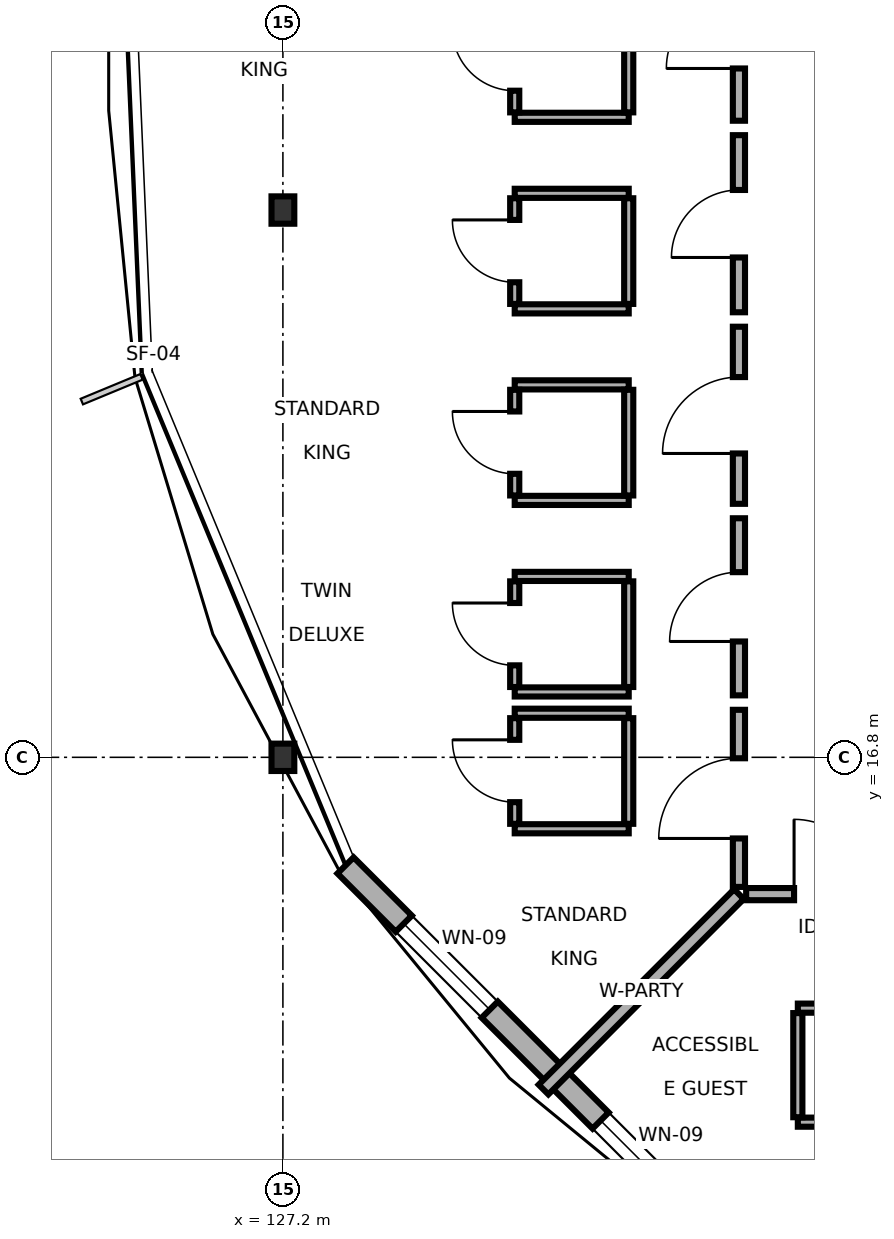
"""IFC4 building model, lengths in metres.
Left out: names, types, materials, properties, quantities, classifications, styles, units other than length and angle.
Written with IfcOpenShell. Run it as: python <this file> out.ifc"""

import sys

from ifc_helpers import new_model, si_unit, direction, frame, frame_2d, origin, origin_2d, place, context, subcontext, project, spatial, rectangle, i_section, extrude, element, fill, save


model = new_model("IFC4")
c1 = context("Model", 3, precision=1e-05, world=origin(), true_north=direction((0.0, 1.0)))
c2 = subcontext(c1, "Body", "Model", "MODEL_VIEW")
j1 = project(units=[si_unit("LENGTHUNIT", "METRE"), si_unit("PLANEANGLEUNIT", "RADIAN")], contexts=[c1])
p1 = place(None, origin())
s1 = spatial("IfcSite", under=j1, at=p1, CompositionType="ELEMENT")
p2 = place(p1, origin())
s2 = spatial("IfcBuilding", under=s1, at=p2, CompositionType="ELEMENT")
p3 = place(p2, frame((0.0, 0.0, 35.1)))
s3 = spatial("IfcBuildingStorey", under=s2, at=p3, CompositionType="ELEMENT", Elevation=35.1)
for number, where, z_axis, x_axis in (
    (1, (127.2, 24.0, 0.0), (0.0, 0.0, 1.0), (1.0, 0.0, 0.0)),
    (2, (127.2, 16.8, 0.0), (0.0, 0.0, 1.0), (1.0, 0.0, 0.0)),
):
    element("IfcColumn", number, at=place(p3, frame(where, z_axis=z_axis, x_axis=x_axis)), inside=s3, PredefinedType="COLUMN", context=c2, shape_type="SweptSolid", body=[
        extrude(i_section(OverallWidth=0.3, OverallDepth=0.36, WebThickness=0.012, FlangeThickness=0.022, FilletRadius=0.027, at=origin_2d()), origin(), (0.0, 0.0, 1.0), 3.4),
    ])
p4 = place(p3, frame((128.024, 15.378, 0.0), z_axis=(0.0, 0.0, 1.0), x_axis=(0.707124205549, -0.707089356394, 0.0)))
e3 = element("IfcWall", 3, at=p4, inside=s3, PredefinedType="SOLIDWALL", context=c2, shape_type="SweptSolid", body=[
    extrude(rectangle(XDim=7.006, YDim=0.3, at=frame_2d((3.503, 0.0))), origin(), (0.0, 0.0, 1.0), 3.165),
])
p5 = place(p4, frame((4.746, 0.0, 0.8)))
e4 = element("IfcOpeningElement", 4, at=p5, cuts=e3, PredefinedType="OPENING", context=c2, shape_type="SweptSolid", body=[
    extrude(rectangle(XDim=1.6, YDim=1.5, at=frame_2d((0.8, 0.75))), frame((0.0, 0.16, 0.0), z_axis=(0.0, -1.0, 0.0), x_axis=(1.0, 0.0, 0.0)), (0.0, 0.0, 1.0), 0.32),
])
p6 = place(p4, frame((1.083, 0.0, 0.8)))
e5 = element("IfcOpeningElement", 5, at=p6, cuts=e3, PredefinedType="OPENING", context=c2, shape_type="SweptSolid", body=[
    extrude(rectangle(XDim=1.6, YDim=1.5, at=frame_2d((0.8, 0.75))), frame((0.0, 0.16, 0.0), z_axis=(0.0, -1.0, 0.0), x_axis=(1.0, 0.0, 0.0)), (0.0, 0.0, 1.0), 0.32),
])
p7 = place(p3, frame((133.295, 15.0, 0.0), z_axis=(0.0, 0.0, 1.0), x_axis=(1.0, 0.0, 0.0)))
e6 = element("IfcWall", 6, at=p7, inside=s3, PredefinedType="PARTITIONING", context=c2, shape_type="SweptSolid", body=[
    extrude(rectangle(XDim=2.245, YDim=0.16, at=frame_2d((1.123, 0.0))), origin(), (0.0, 0.0, 1.0), 3.165),
])
p8 = place(p7, frame((0.631, 0.0, 0.0)))
e7 = element("IfcOpeningElement", 7, at=p8, cuts=e6, PredefinedType="OPENING", context=c2, shape_type="SweptSolid", body=[
    extrude(rectangle(XDim=0.984, YDim=2.07, at=frame_2d((0.492, 1.035))), frame((0.0, 0.09, 0.0), z_axis=(0.0, -1.0, 0.0), x_axis=(1.0, 0.0, 0.0)), (0.0, 0.0, 1.0), 0.18),
])
p9 = place(p3, frame((133.975, 12.0, 0.0), z_axis=(0.0, 0.0, 1.0), x_axis=(1.0, 0.0, 0.0)))
e8 = element("IfcWall", 8, at=p9, inside=s3, PredefinedType="PARTITIONING", context=c2, shape_type="SweptSolid", body=[
    extrude(rectangle(XDim=1.52, YDim=0.12, at=frame_2d((0.76, 0.0))), origin(), (0.0, 0.0, 1.0), 2.75),
])
p10 = place(p9, frame((0.35, 0.0, 0.0)))
e9 = element("IfcOpeningElement", 9, at=p10, cuts=e8, PredefinedType="OPENING", context=c2, shape_type="SweptSolid", body=[
    extrude(rectangle(XDim=0.82, YDim=2.08, at=frame_2d((0.41, 1.04))), frame((0.0, 0.07, 0.0), z_axis=(0.0, -1.0, 0.0), x_axis=(1.0, 0.0, 0.0)), (0.0, 0.0, 1.0), 0.14),
])
p11 = place(p3, frame((133.975, 13.5, 0.0), z_axis=(0.0, 0.0, 1.0), x_axis=(1.0, 0.0, 0.0)))
e10 = element("IfcWall", 10, at=p11, inside=s3, PredefinedType="PARTITIONING", context=c2, shape_type="SweptSolid", body=[
    extrude(rectangle(XDim=1.52, YDim=0.12, at=frame_2d((0.76, 0.0))), origin(), (0.0, 0.0, 1.0), 3.165),
])
p12 = place(p3, frame((133.975, 12.065, 0.0), z_axis=(0.0, 0.0, 1.0), x_axis=(0.0, 1.0, 0.0)))
e11 = element("IfcWall", 11, at=p12, inside=s3, PredefinedType="PARTITIONING", context=c2, shape_type="SweptSolid", body=[
    extrude(rectangle(XDim=1.37, YDim=0.12, at=frame_2d((0.685, 0.0))), origin(), (0.0, 0.0, 1.0), 3.165),
])
p13 = place(p3, frame((133.2, 15.0, 0.0), z_axis=(0.0, 0.0, 1.0), x_axis=(-0.707106781187, -0.707106781187, 0.0)))
e12 = element("IfcWall", 12, at=p13, inside=s3, PredefinedType="PARTITIONING", context=c2, shape_type="SweptSolid", body=[
    extrude(rectangle(XDim=3.636, YDim=0.18, at=frame_2d((1.818, 0.0))), origin(), (0.0, 0.0, 1.0), 2.65),
])
p14 = place(p3, frame((133.2, 25.175, 0.0), z_axis=(0.0, 0.0, 1.0), x_axis=(0.0, 1.0, 0.0)))
e13 = element("IfcWall", 13, at=p14, inside=s3, PredefinedType="PARTITIONING", context=c2, shape_type="SweptSolid", body=[
    extrude(rectangle(XDim=2.33, YDim=0.16, at=frame_2d((1.165, 0.0))), origin(), (0.0, 0.0, 1.0), 3.165),
])
p15 = place(p14, frame((0.688, 0.0, 0.0)))
e14 = element("IfcOpeningElement", 14, at=p15, cuts=e13, PredefinedType="OPENING", context=c2, shape_type="SweptSolid", body=[
    extrude(rectangle(XDim=0.955, YDim=2.05, at=frame_2d((0.478, 1.025))), frame((0.0, 0.09, 0.0), z_axis=(0.0, -1.0, 0.0), x_axis=(1.0, 0.0, 0.0)), (0.0, 0.0, 1.0), 0.18),
])
p16 = place(p3, frame((130.25, 25.22, 0.0), z_axis=(0.0, 0.0, 1.0), x_axis=(1.0, 0.0, 0.0)))
e15 = element("IfcWall", 15, at=p16, inside=s3, PredefinedType="PARTITIONING", context=c2, shape_type="SweptSolid", body=[
    extrude(rectangle(XDim=1.5, YDim=0.12, at=frame_2d((0.75, 0.0))), origin(), (0.0, 0.0, 1.0), 3.165),
])
p17 = place(p3, frame((130.25, 25.285, 0.0), z_axis=(0.0, 0.0, 1.0), x_axis=(0.0, 1.0, 0.0)))
e16 = element("IfcWall", 16, at=p17, inside=s3, PredefinedType="PARTITIONING", context=c2, shape_type="SweptSolid", body=[
    extrude(rectangle(XDim=1.39, YDim=0.12, at=frame_2d((0.695, 0.0))), origin(), (0.0, 0.0, 1.0), 3.165),
])
p18 = place(p17, frame((0.285, 0.0, 0.0)))
e17 = element("IfcOpeningElement", 17, at=p18, cuts=e16, PredefinedType="OPENING", context=c2, shape_type="SweptSolid", body=[
    extrude(rectangle(XDim=0.82, YDim=2.08, at=frame_2d((0.41, 1.04))), frame((0.0, 0.07, 0.0), z_axis=(0.0, -1.0, 0.0), x_axis=(1.0, 0.0, 0.0)), (0.0, 0.0, 1.0), 0.14),
])
p19 = place(p3, frame((131.75, 25.285, 0.0), z_axis=(0.0, 0.0, 1.0), x_axis=(0.0, 1.0, 0.0)))
e18 = element("IfcWall", 18, at=p19, inside=s3, PredefinedType="PARTITIONING", context=c2, shape_type="SweptSolid", body=[
    extrude(rectangle(XDim=1.39, YDim=0.12, at=frame_2d((0.695, 0.0))), origin(), (0.0, 0.0, 1.0), 3.165),
])
p20 = place(p3, frame((133.2, 22.655, 0.0), z_axis=(0.0, 0.0, 1.0), x_axis=(0.0, 1.0, 0.0)))
e19 = element("IfcWall", 19, at=p20, inside=s3, PredefinedType="PARTITIONING", context=c2, shape_type="SweptSolid", body=[
    extrude(rectangle(XDim=2.33, YDim=0.16, at=frame_2d((1.165, 0.0))), origin(), (0.0, 0.0, 1.0), 2.75),
])
p21 = place(p20, frame((0.721, 0.0, 0.0)))
e20 = element("IfcOpeningElement", 20, at=p21, cuts=e19, PredefinedType="OPENING", context=c2, shape_type="SweptSolid", body=[
    extrude(rectangle(XDim=0.888, YDim=2.07, at=frame_2d((0.444, 1.035))), frame((0.0, 0.09, 0.0), z_axis=(0.0, -1.0, 0.0), x_axis=(1.0, 0.0, 0.0)), (0.0, 0.0, 1.0), 0.18),
])
p22 = place(p3, frame((130.25, 22.7, 0.0), z_axis=(0.0, 0.0, 1.0), x_axis=(1.0, 0.0, 0.0)))
e21 = element("IfcWall", 21, at=p22, inside=s3, PredefinedType="PARTITIONING", context=c2, shape_type="SweptSolid", body=[
    extrude(rectangle(XDim=1.5, YDim=0.12, at=frame_2d((0.75, 0.0))), origin(), (0.0, 0.0, 1.0), 3.165),
])
p23 = place(p3, frame((130.25, 24.22, 0.0), z_axis=(0.0, 0.0, 1.0), x_axis=(1.0, 0.0, 0.0)))
e22 = element("IfcWall", 22, at=p23, inside=s3, PredefinedType="PARTITIONING", context=c2, shape_type="SweptSolid", body=[
    extrude(rectangle(XDim=1.5, YDim=0.12, at=frame_2d((0.75, 0.0))), origin(), (0.0, 0.0, 1.0), 2.75),
])
p24 = place(p3, frame((130.25, 22.765, 0.0), z_axis=(0.0, 0.0, 1.0), x_axis=(0.0, 1.0, 0.0)))
e23 = element("IfcWall", 23, at=p24, inside=s3, PredefinedType="PARTITIONING", context=c2, shape_type="SweptSolid", body=[
    extrude(rectangle(XDim=1.39, YDim=0.12, at=frame_2d((0.695, 0.0))), origin(), (0.0, 0.0, 1.0), 2.75),
])
p25 = place(p24, frame((0.285, 0.0, 0.0)))
e24 = element("IfcOpeningElement", 24, at=p25, cuts=e23, PredefinedType="OPENING", context=c2, shape_type="SweptSolid", body=[
    extrude(rectangle(XDim=0.82, YDim=2.08, at=frame_2d((0.41, 1.04))), frame((0.0, 0.07, 0.0), z_axis=(0.0, -1.0, 0.0), x_axis=(1.0, 0.0, 0.0)), (0.0, 0.0, 1.0), 0.14),
])
p26 = place(p3, frame((131.75, 22.765, 0.0), z_axis=(0.0, 0.0, 1.0), x_axis=(0.0, 1.0, 0.0)))
e25 = element("IfcWall", 25, at=p26, inside=s3, PredefinedType="PARTITIONING", context=c2, shape_type="SweptSolid", body=[
    extrude(rectangle(XDim=1.39, YDim=0.12, at=frame_2d((0.695, 0.0))), origin(), (0.0, 0.0, 1.0), 2.75),
])
p27 = place(p3, frame((133.2, 20.135, 0.0), z_axis=(0.0, 0.0, 1.0), x_axis=(0.0, 1.0, 0.0)))
e26 = element("IfcWall", 26, at=p27, inside=s3, PredefinedType="PARTITIONING", context=c2, shape_type="SweptSolid", body=[
    extrude(rectangle(XDim=2.33, YDim=0.16, at=frame_2d((1.165, 0.0))), origin(), (0.0, 0.0, 1.0), 3.165),
])
p28 = place(p27, frame((0.663, 0.0, 0.0)))
e27 = element("IfcOpeningElement", 27, at=p28, cuts=e26, PredefinedType="OPENING", context=c2, shape_type="SweptSolid", body=[
    extrude(rectangle(XDim=1.005, YDim=2.05, at=frame_2d((0.502, 1.025))), frame((0.0, 0.09, 0.0), z_axis=(0.0, -1.0, 0.0), x_axis=(1.0, 0.0, 0.0)), (0.0, 0.0, 1.0), 0.18),
])
for number, where, z_axis, x_axis in (
    (28, (130.25, 20.18, 0.0), (0.0, 0.0, 1.0), (1.0, 0.0, 0.0)),
    (29, (130.25, 21.7, 0.0), (0.0, 0.0, 1.0), (1.0, 0.0, 0.0)),
):
    element("IfcWall", number, at=place(p3, frame(where, z_axis=z_axis, x_axis=x_axis)), inside=s3, PredefinedType="PARTITIONING", context=c2, shape_type="SweptSolid", body=[
        extrude(rectangle(XDim=1.5, YDim=0.12, at=frame_2d((0.75, 0.0))), origin(), (0.0, 0.0, 1.0), 3.165),
    ])
p29 = place(p3, frame((130.25, 20.245, 0.0), z_axis=(0.0, 0.0, 1.0), x_axis=(0.0, 1.0, 0.0)))
e30 = element("IfcWall", 30, at=p29, inside=s3, PredefinedType="PARTITIONING", context=c2, shape_type="SweptSolid", body=[
    extrude(rectangle(XDim=1.39, YDim=0.12, at=frame_2d((0.695, 0.0))), origin(), (0.0, 0.0, 1.0), 3.165),
])
p30 = place(p29, frame((0.285, 0.0, 0.0)))
e31 = element("IfcOpeningElement", 31, at=p30, cuts=e30, PredefinedType="OPENING", context=c2, shape_type="SweptSolid", body=[
    extrude(rectangle(XDim=0.82, YDim=2.08, at=frame_2d((0.41, 1.04))), frame((0.0, 0.07, 0.0), z_axis=(0.0, -1.0, 0.0), x_axis=(1.0, 0.0, 0.0)), (0.0, 0.0, 1.0), 0.14),
])
p31 = place(p3, frame((131.75, 20.245, 0.0), z_axis=(0.0, 0.0, 1.0), x_axis=(0.0, 1.0, 0.0)))
e32 = element("IfcWall", 32, at=p31, inside=s3, PredefinedType="PARTITIONING", context=c2, shape_type="SweptSolid", body=[
    extrude(rectangle(XDim=1.39, YDim=0.12, at=frame_2d((0.695, 0.0))), origin(), (0.0, 0.0, 1.0), 3.165),
])
p32 = place(p3, frame((133.2, 17.615, 0.0), z_axis=(0.0, 0.0, 1.0), x_axis=(0.0, 1.0, 0.0)))
e33 = element("IfcWall", 33, at=p32, inside=s3, PredefinedType="PARTITIONING", context=c2, shape_type="SweptSolid", body=[
    extrude(rectangle(XDim=2.33, YDim=0.16, at=frame_2d((1.165, 0.0))), origin(), (0.0, 0.0, 1.0), 3.165),
])
p33 = place(p32, frame((0.709, 0.0, 0.0)))
e34 = element("IfcOpeningElement", 34, at=p33, cuts=e33, PredefinedType="OPENING", context=c2, shape_type="SweptSolid", body=[
    extrude(rectangle(XDim=0.912, YDim=2.13, at=frame_2d((0.456, 1.065))), frame((0.0, 0.09, 0.0), z_axis=(0.0, -1.0, 0.0), x_axis=(1.0, 0.0, 0.0)), (0.0, 0.0, 1.0), 0.18),
])
for number, where, z_axis, x_axis in (
    (35, (130.25, 17.66, 0.0), (0.0, 0.0, 1.0), (1.0, 0.0, 0.0)),
    (36, (130.25, 19.18, 0.0), (0.0, 0.0, 1.0), (1.0, 0.0, 0.0)),
):
    element("IfcWall", number, at=place(p3, frame(where, z_axis=z_axis, x_axis=x_axis)), inside=s3, PredefinedType="PARTITIONING", context=c2, shape_type="SweptSolid", body=[
        extrude(rectangle(XDim=1.5, YDim=0.12, at=frame_2d((0.75, 0.0))), origin(), (0.0, 0.0, 1.0), 3.165),
    ])
p34 = place(p3, frame((130.25, 17.725, 0.0), z_axis=(0.0, 0.0, 1.0), x_axis=(0.0, 1.0, 0.0)))
e37 = element("IfcWall", 37, at=p34, inside=s3, PredefinedType="PARTITIONING", context=c2, shape_type="SweptSolid", body=[
    extrude(rectangle(XDim=1.39, YDim=0.12, at=frame_2d((0.695, 0.0))), origin(), (0.0, 0.0, 1.0), 3.165),
])
p35 = place(p34, frame((0.285, 0.0, 0.0)))
e38 = element("IfcOpeningElement", 38, at=p35, cuts=e37, PredefinedType="OPENING", context=c2, shape_type="SweptSolid", body=[
    extrude(rectangle(XDim=0.82, YDim=2.08, at=frame_2d((0.41, 1.04))), frame((0.0, 0.07, 0.0), z_axis=(0.0, -1.0, 0.0), x_axis=(1.0, 0.0, 0.0)), (0.0, 0.0, 1.0), 0.14),
])
p36 = place(p3, frame((131.75, 17.725, 0.0), z_axis=(0.0, 0.0, 1.0), x_axis=(0.0, 1.0, 0.0)))
e39 = element("IfcWall", 39, at=p36, inside=s3, PredefinedType="PARTITIONING", context=c2, shape_type="SweptSolid", body=[
    extrude(rectangle(XDim=1.39, YDim=0.12, at=frame_2d((0.695, 0.0))), origin(), (0.0, 0.0, 1.0), 3.165),
])
p37 = place(p3, frame((133.2, 15.095, 0.0), z_axis=(0.0, 0.0, 1.0), x_axis=(0.0, 1.0, 0.0)))
e40 = element("IfcWall", 40, at=p37, inside=s3, PredefinedType="PARTITIONING", context=c2, shape_type="SweptSolid", body=[
    extrude(rectangle(XDim=2.33, YDim=0.16, at=frame_2d((1.165, 0.0))), origin(), (0.0, 0.0, 1.0), 2.75),
])
p38 = place(p37, frame((0.637, 0.0, 0.0)))
e41 = element("IfcOpeningElement", 41, at=p38, cuts=e40, PredefinedType="OPENING", context=c2, shape_type="SweptSolid", body=[
    extrude(rectangle(XDim=1.055, YDim=2.05, at=frame_2d((0.527, 1.025))), frame((0.0, 0.09, 0.0), z_axis=(0.0, -1.0, 0.0), x_axis=(1.0, 0.0, 0.0)), (0.0, 0.0, 1.0), 0.18),
])
for number, where, z_axis, x_axis in (
    (42, (130.25, 15.86, 0.0), (0.0, 0.0, 1.0), (1.0, 0.0, 0.0)),
    (43, (130.25, 17.38, 0.0), (0.0, 0.0, 1.0), (1.0, 0.0, 0.0)),
):
    element("IfcWall", number, at=place(p3, frame(where, z_axis=z_axis, x_axis=x_axis)), inside=s3, PredefinedType="PARTITIONING", context=c2, shape_type="SweptSolid", body=[
        extrude(rectangle(XDim=1.5, YDim=0.12, at=frame_2d((0.75, 0.0))), origin(), (0.0, 0.0, 1.0), 3.165),
    ])
p39 = place(p3, frame((130.25, 15.925, 0.0), z_axis=(0.0, 0.0, 1.0), x_axis=(0.0, 1.0, 0.0)))
e44 = element("IfcWall", 44, at=p39, inside=s3, PredefinedType="PARTITIONING", context=c2, shape_type="SweptSolid", body=[
    extrude(rectangle(XDim=1.39, YDim=0.12, at=frame_2d((0.695, 0.0))), origin(), (0.0, 0.0, 1.0), 2.75),
])
p40 = place(p39, frame((0.285, 0.0, 0.0)))
e45 = element("IfcOpeningElement", 45, at=p40, cuts=e44, PredefinedType="OPENING", context=c2, shape_type="SweptSolid", body=[
    extrude(rectangle(XDim=0.82, YDim=2.08, at=frame_2d((0.41, 1.04))), frame((0.0, 0.07, 0.0), z_axis=(0.0, -1.0, 0.0), x_axis=(1.0, 0.0, 0.0)), (0.0, 0.0, 1.0), 0.14),
])
p41 = place(p3, frame((131.75, 15.925, 0.0), z_axis=(0.0, 0.0, 1.0), x_axis=(0.0, 1.0, 0.0)))
e46 = element("IfcWall", 46, at=p41, inside=s3, PredefinedType="PARTITIONING", context=c2, shape_type="SweptSolid", body=[
    extrude(rectangle(XDim=1.39, YDim=0.12, at=frame_2d((0.695, 0.0))), origin(), (0.0, 0.0, 1.0), 2.75),
])
p42 = place(p5, origin())
e47 = element("IfcWindow", 47, at=p42, inside=s3, PartitioningType="SINGLE_PANEL", PredefinedType="WINDOW", context=c2, shape_type="SweptSolid", body=[
    extrude(rectangle(XDim=1.6, YDim=1.5, at=frame_2d((0.8, 0.75))), frame((0.0, 0.03, 0.0), z_axis=(0.0, -1.0, 0.0), x_axis=(1.0, 0.0, 0.0)), (0.0, 0.0, 1.0), 0.06),
])
fill(e4, e47)
p43 = place(p6, origin())
e48 = element("IfcWindow", 48, at=p43, inside=s3, PartitioningType="SINGLE_PANEL", PredefinedType="WINDOW", context=c2, shape_type="SweptSolid", body=[
    extrude(rectangle(XDim=1.6, YDim=1.5, at=frame_2d((0.8, 0.75))), frame((0.0, 0.03, 0.0), z_axis=(0.0, -1.0, 0.0), x_axis=(1.0, 0.0, 0.0)), (0.0, 0.0, 1.0), 0.06),
])
fill(e5, e48)
p44 = place(p8, origin())
e49 = element("IfcDoor", 49, at=p44, inside=s3, OperationType="SINGLE_SWING_LEFT", PredefinedType="DOOR", context=c2, shape_type="SweptSolid", body=[
    extrude(rectangle(XDim=0.984, YDim=2.07, at=frame_2d((0.492, 1.035))), frame((0.0, 0.025, 0.0), z_axis=(0.0, -1.0, 0.0), x_axis=(1.0, 0.0, 0.0)), (0.0, 0.0, 1.0), 0.05),
])
fill(e7, e49)
p45 = place(p15, origin())
e50 = element("IfcDoor", 50, at=p45, inside=s3, OperationType="SINGLE_SWING_LEFT", PredefinedType="DOOR", context=c2, shape_type="SweptSolid", body=[
    extrude(rectangle(XDim=0.955, YDim=2.05, at=frame_2d((0.478, 1.025))), frame((0.0, 0.025, 0.0), z_axis=(0.0, -1.0, 0.0), x_axis=(1.0, 0.0, 0.0)), (0.0, 0.0, 1.0), 0.05),
])
fill(e14, e50)
p46 = place(p18, origin())
e51 = element("IfcDoor", 51, at=p46, inside=s3, OperationType="SINGLE_SWING_RIGHT", PredefinedType="DOOR", context=c2, shape_type="SweptSolid", body=[
    extrude(rectangle(XDim=0.82, YDim=2.08, at=frame_2d((0.41, 1.04))), frame((0.0, 0.025, 0.0), z_axis=(0.0, -1.0, 0.0), x_axis=(1.0, 0.0, 0.0)), (0.0, 0.0, 1.0), 0.05),
])
fill(e17, e51)
p47 = place(p21, origin())
e52 = element("IfcDoor", 52, at=p47, inside=s3, OperationType="SINGLE_SWING_LEFT", PredefinedType="DOOR", context=c2, shape_type="SweptSolid", body=[
    extrude(rectangle(XDim=0.888, YDim=2.07, at=frame_2d((0.444, 1.035))), frame((0.0, 0.025, 0.0), z_axis=(0.0, -1.0, 0.0), x_axis=(1.0, 0.0, 0.0)), (0.0, 0.0, 1.0), 0.05),
])
fill(e20, e52)
p48 = place(p25, origin())
e53 = element("IfcDoor", 53, at=p48, inside=s3, OperationType="SINGLE_SWING_RIGHT", PredefinedType="DOOR", context=c2, shape_type="SweptSolid", body=[
    extrude(rectangle(XDim=0.82, YDim=2.08, at=frame_2d((0.41, 1.04))), frame((0.0, 0.025, 0.0), z_axis=(0.0, -1.0, 0.0), x_axis=(1.0, 0.0, 0.0)), (0.0, 0.0, 1.0), 0.05),
])
fill(e24, e53)
p49 = place(p28, origin())
e54 = element("IfcDoor", 54, at=p49, inside=s3, OperationType="SINGLE_SWING_LEFT", PredefinedType="DOOR", context=c2, shape_type="SweptSolid", body=[
    extrude(rectangle(XDim=1.005, YDim=2.05, at=frame_2d((0.502, 1.025))), frame((0.0, 0.025, 0.0), z_axis=(0.0, -1.0, 0.0), x_axis=(1.0, 0.0, 0.0)), (0.0, 0.0, 1.0), 0.05),
])
fill(e27, e54)
p50 = place(p30, origin())
e55 = element("IfcDoor", 55, at=p50, inside=s3, OperationType="SINGLE_SWING_RIGHT", PredefinedType="DOOR", context=c2, shape_type="SweptSolid", body=[
    extrude(rectangle(XDim=0.82, YDim=2.08, at=frame_2d((0.41, 1.04))), frame((0.0, 0.025, 0.0), z_axis=(0.0, -1.0, 0.0), x_axis=(1.0, 0.0, 0.0)), (0.0, 0.0, 1.0), 0.05),
])
fill(e31, e55)
p51 = place(p33, origin())
e56 = element("IfcDoor", 56, at=p51, inside=s3, OperationType="SINGLE_SWING_LEFT", PredefinedType="DOOR", context=c2, shape_type="SweptSolid", body=[
    extrude(rectangle(XDim=0.912, YDim=2.13, at=frame_2d((0.456, 1.065))), frame((0.0, 0.025, 0.0), z_axis=(0.0, -1.0, 0.0), x_axis=(1.0, 0.0, 0.0)), (0.0, 0.0, 1.0), 0.05),
])
fill(e34, e56)
p52 = place(p35, origin())
e57 = element("IfcDoor", 57, at=p52, inside=s3, OperationType="SINGLE_SWING_RIGHT", PredefinedType="DOOR", context=c2, shape_type="SweptSolid", body=[
    extrude(rectangle(XDim=0.82, YDim=2.08, at=frame_2d((0.41, 1.04))), frame((0.0, 0.025, 0.0), z_axis=(0.0, -1.0, 0.0), x_axis=(1.0, 0.0, 0.0)), (0.0, 0.0, 1.0), 0.05),
])
fill(e38, e57)
p53 = place(p38, origin())
e58 = element("IfcDoor", 58, at=p53, inside=s3, OperationType="SINGLE_SWING_LEFT", PredefinedType="DOOR", context=c2, shape_type="SweptSolid", body=[
    extrude(rectangle(XDim=1.055, YDim=2.05, at=frame_2d((0.527, 1.025))), frame((0.0, 0.025, 0.0), z_axis=(0.0, -1.0, 0.0), x_axis=(1.0, 0.0, 0.0)), (0.0, 0.0, 1.0), 0.05),
])
fill(e41, e58)
p54 = place(p40, origin())
e59 = element("IfcDoor", 59, at=p54, inside=s3, OperationType="SINGLE_SWING_RIGHT", PredefinedType="DOOR", context=c2, shape_type="SweptSolid", body=[
    extrude(rectangle(XDim=0.82, YDim=2.08, at=frame_2d((0.41, 1.04))), frame((0.0, 0.025, 0.0), z_axis=(0.0, -1.0, 0.0), x_axis=(1.0, 0.0, 0.0)), (0.0, 0.0, 1.0), 0.05),
])
fill(e45, e59)
save(model, sys.argv[1])
